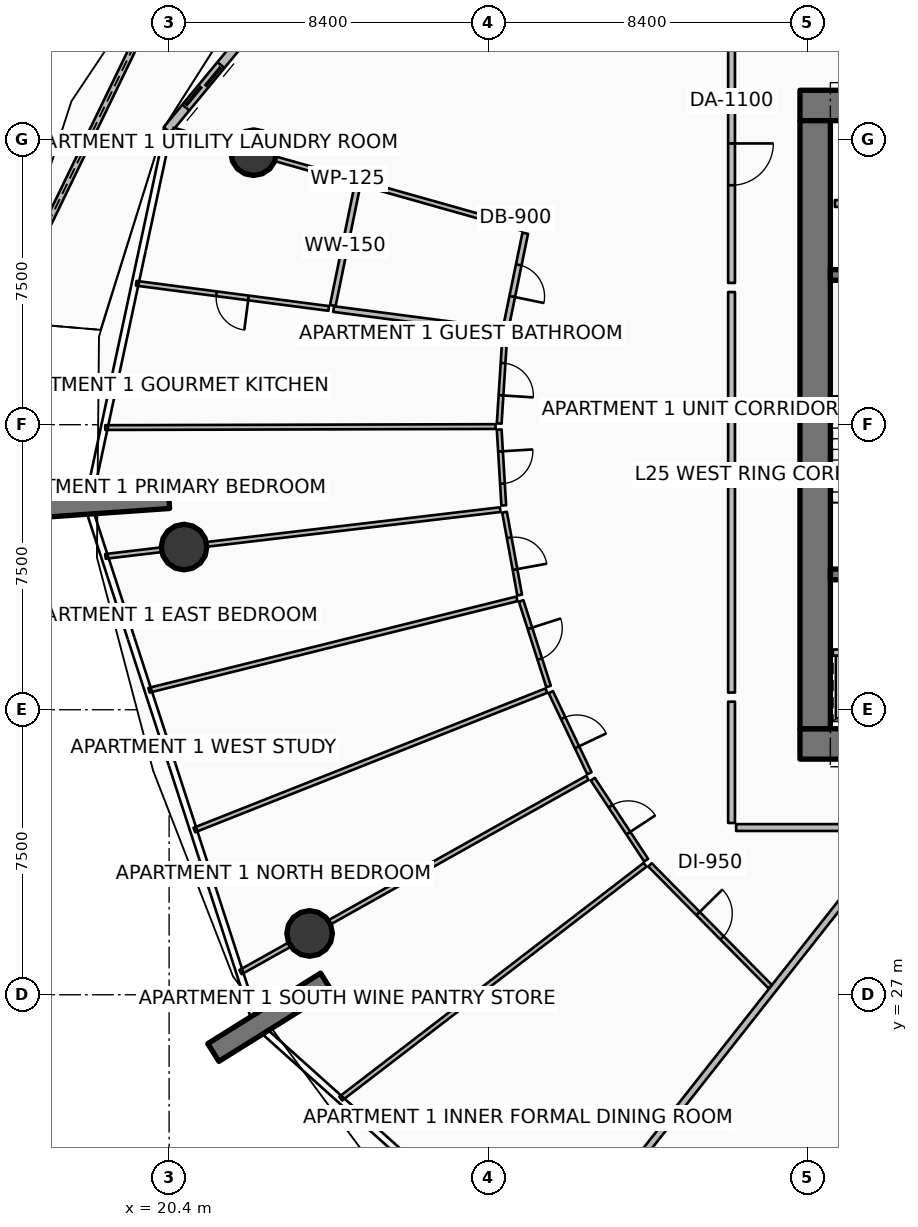
"""IFC4 building model, lengths in metres.
Left out: names, types, materials, properties, quantities, classifications, styles, units other than length and angle.
Written with IfcOpenShell. Run it as: python <this file> out.ifc"""

import sys

from ifc_helpers import new_model, si_unit, direction, frame, frame_2d, origin, origin_2d, place, context, subcontext, project, spatial, polyline, rectangle, circle, outline, extrude, element, fill, save


model = new_model("IFC4")
c1 = context("Model", 3, precision=1e-05, world=origin(), true_north=direction((0.0, 1.0)))
c2 = subcontext(c1, "Body", "Model", "MODEL_VIEW")
j1 = project(units=[si_unit("LENGTHUNIT", "METRE"), si_unit("PLANEANGLEUNIT", "RADIAN")], contexts=[c1])
p1 = place(None, origin())
s1 = spatial("IfcSite", under=j1, at=p1, CompositionType="ELEMENT")
p2 = place(p1, origin())
s2 = spatial("IfcBuilding", under=s1, at=p2, CompositionType="ELEMENT")
p3 = place(p2, frame((0.0, 0.0, 101.4)))
s3 = spatial("IfcBuildingStorey", under=s2, at=p3, CompositionType="ELEMENT", Elevation=101.4)
for number, where, z_axis, x_axis in (
    (1, (37.0, 33.6, 0.0), (0.0, 0.0, 1.0), (1.0, 0.0, 0.0)),
    (2, (37.0, 50.4, 0.0), (0.0, 0.0, 1.0), (1.0, 0.0, 0.0)),
):
    element("IfcWall", number, at=place(p3, frame(where, z_axis=z_axis, x_axis=x_axis)), inside=s3, PredefinedType="SHEAR", context=c2, shape_type="SweptSolid", body=[
        extrude(rectangle(XDim=9.9, YDim=0.8, at=frame_2d((4.95, 0.0))), origin(), (0.0, 0.0, 1.0), 3.75),
    ])
p4 = place(p3, frame((37.4, 34.0, 0.0), z_axis=(0.0, 0.0, 1.0), x_axis=(0.0, 1.0, 0.0)))
e3 = element("IfcWall", 3, at=p4, inside=s3, PredefinedType="SHEAR", context=c2, shape_type="SweptSolid", body=[
    extrude(rectangle(XDim=16.0, YDim=0.8, at=frame_2d((8.0, 0.0))), origin(), (0.0, 0.0, 1.0), 3.75),
])
for number, where, z_axis, x_axis in (
    (4, (37.8, 38.06, 0.0), (0.0, 0.0, 1.0), (1.0, 0.0, 0.0)),
    (5, (37.8, 45.94, 0.0), (0.0, 0.0, 1.0), (1.0, 0.0, 0.0)),
):
    element("IfcWall", number, at=place(p3, frame(where, z_axis=z_axis, x_axis=x_axis)), inside=s3, PredefinedType="SHEAR", context=c2, shape_type="SweptSolid", body=[
        extrude(rectangle(XDim=3.5, YDim=0.28, at=frame_2d((1.75, 0.0))), origin(), (0.0, 0.0, 1.0), 3.75),
    ])
for number, where, z_axis, x_axis in (
    (6, (20.394, 40.07, 0.0), (0.0, 0.0, 1.0), (-0.998, -0.07, 0.0)),
    (7, (24.531, 27.335, 0.0), (0.0, 0.0, 1.0), (-0.848, -0.53, 0.0)),
):
    element("IfcWall", number, at=place(p3, frame(where, z_axis=z_axis, x_axis=x_axis)), inside=s3, PredefinedType="SOLIDWALL", context=c2, shape_type="SweptSolid", body=[
        extrude(rectangle(XDim=3.5, YDim=0.55, at=frame_2d((1.75, 0.0))), origin(), (0.0, 0.0, 1.0), 3.75),
    ])
for number, where, z_axis, x_axis in (
    (8, (22.623, 49.157, 0.0), (0.0, 0.0, 1.0), (1.0, 0.0, 0.0)),
    (9, (20.793, 38.78, 0.0), (0.0, 0.0, 1.0), (1.0, 0.0, 0.0)),
    (10, (24.097, 28.614, 0.0), (0.0, 0.0, 1.0), (1.0, 0.0, 0.0)),
):
    element("IfcColumn", number, at=place(p3, frame(where, z_axis=z_axis, x_axis=x_axis)), inside=s3, PredefinedType="COLUMN", context=c2, shape_type="SweptSolid", body=[
        extrude(circle(Radius=0.6, at=origin_2d()), origin(), (0.0, 0.0, 1.0), 3.5),
    ])
p5 = place(p3, frame((21.198, 55.521, 0.0), z_axis=(0.0, 0.0, 1.0), x_axis=(-0.436107839058, -0.89989441198, 0.0)))
e11 = element("IfcWall", 11, at=p5, inside=s3, PredefinedType="PARAPET", context=c2, shape_type="SweptSolid", body=[
    extrude(outline(polyline([(0.0, 0.0), (12.005, 0.0), (12.005, 1.86), (6.002, 1.798), (0.0, 1.632), (0.0, 0.0)])), frame((0.0, 0.09, 0.0), z_axis=(0.0, -1.0, 0.0), x_axis=(1.0, 0.0, 0.0)), (0.0, 0.0, 1.0), 0.18),
])
p6 = place(p3, frame((27.407, 58.298, 0.0), z_axis=(0.0, 0.0, 1.0), x_axis=(-0.636704975, -0.771107498868, 0.0)))
e12 = element("IfcWall", 12, at=p6, inside=s3, PredefinedType="SOLIDWALL", context=c2, shape_type="SweptSolid", body=[
    extrude(rectangle(XDim=11.084, YDim=0.24, at=frame_2d((5.542, 0.0))), origin(), (0.0, 0.0, 1.0), 2.45),
])
p7 = place(p6, frame((8.864, 0.0, 0.0)))
e13 = element("IfcOpeningElement", 13, at=p7, cuts=e12, PredefinedType="OPENING", context=c2, shape_type="SweptSolid", body=[
    extrude(rectangle(XDim=1.45, YDim=2.15, at=frame_2d((0.725, 1.075))), frame((0.0, 0.13, 0.0), z_axis=(0.0, -1.0, 0.0), x_axis=(1.0, 0.0, 0.0)), (0.0, 0.0, 1.0), 0.26),
])
p8 = place(p6, frame((0.28, 0.0, 0.65)))
e14 = element("IfcOpeningElement", 14, at=p8, cuts=e12, PredefinedType="OPENING", context=c2, shape_type="SweptSolid", body=[
    extrude(rectangle(XDim=1.6, YDim=1.5, at=frame_2d((0.8, 0.75))), frame((0.0, 0.13, 0.0), z_axis=(0.0, -1.0, 0.0), x_axis=(1.0, 0.0, 0.0)), (0.0, 0.0, 1.0), 0.26),
])
p9 = place(p3, frame((37.865, 36.005, 0.0), z_axis=(0.0, 0.0, 1.0), x_axis=(1.0, 0.0, 0.0)))
e15 = element("IfcWall", 15, at=p9, inside=s3, PredefinedType="PARTITIONING", context=c2, shape_type="SweptSolid", body=[
    extrude(rectangle(XDim=2.11, YDim=0.16, at=frame_2d((1.055, 0.0))), origin(), (0.0, 0.0, 1.0), 3.5),
])
p10 = place(p9, frame((0.505, 0.0, 0.0)))
e16 = element("IfcOpeningElement", 16, at=p10, cuts=e15, PredefinedType="OPENING", context=c2, shape_type="SweptSolid", body=[
    extrude(rectangle(XDim=1.1, YDim=2.1, at=frame_2d((0.55, 1.05))), frame((0.0, 0.09, 0.0), z_axis=(0.0, -1.0, 0.0), x_axis=(1.0, 0.0, 0.0)), (0.0, 0.0, 1.0), 0.18),
])
p11 = place(p3, frame((37.92, 47.82, 0.0), z_axis=(0.0, 0.0, 1.0), x_axis=(1.0, 0.0, 0.0)))
e17 = element("IfcWall", 17, at=p11, inside=s3, PredefinedType="PARTITIONING", context=c2, shape_type="SweptSolid", body=[
    extrude(rectangle(XDim=6.26, YDim=0.18, at=frame_2d((3.13, 0.0))), origin(), (0.0, 0.0, 1.0), 3.5),
])
p12 = place(p11, frame((2.705, 0.0, 0.0)))
e18 = element("IfcOpeningElement", 18, at=p12, cuts=e17, PredefinedType="OPENING", context=c2, shape_type="SweptSolid", body=[
    extrude(rectangle(XDim=0.85, YDim=2.06, at=frame_2d((0.425, 1.03))), frame((0.0, 0.1, 0.0), z_axis=(0.0, -1.0, 0.0), x_axis=(1.0, 0.0, 0.0)), (0.0, 0.0, 1.0), 0.2),
])
p13 = place(p3, frame((39.575, 31.314, 0.0), z_axis=(0.0, 0.0, 1.0), x_axis=(-0.619083417853, -0.785325233098, 0.0)))
e19 = element("IfcWall", 19, at=p13, inside=s3, PredefinedType="PARTITIONING", context=c2, shape_type="SweptSolid", body=[
    extrude(rectangle(XDim=15.063, YDim=0.18, at=frame_2d((7.532, 0.0))), origin(), (0.0, 0.0, 1.0), 2.94),
])
p14 = place(p3, frame((35.2, 51.971, 0.0), z_axis=(0.0, 0.0, 1.0), x_axis=(0.0, -1.0, 0.0)))
e20 = element("IfcWall", 20, at=p14, inside=s3, PredefinedType="PARTITIONING", context=c2, shape_type="SweptSolid", body=[
    extrude(rectangle(XDim=6.241, YDim=0.18, at=frame_2d((3.12, 0.0))), origin(), (0.0, 0.0, 1.0), 2.94),
])
p15 = place(p14, frame((2.57, 0.0, 0.0)))
e21 = element("IfcOpeningElement", 21, at=p15, cuts=e20, PredefinedType="OPENING", context=c2, shape_type="SweptSolid", body=[
    extrude(rectangle(XDim=1.1, YDim=2.1, at=frame_2d((0.55, 1.05))), frame((0.0, 0.1, 0.0), z_axis=(0.0, -1.0, 0.0), x_axis=(1.0, 0.0, 0.0)), (0.0, 0.0, 1.0), 0.2),
])
p16 = place(p3, frame((35.2, 45.49, 0.0), z_axis=(0.0, 0.0, 1.0), x_axis=(0.0, -1.0, 0.0)))
e22 = element("IfcWall", 22, at=p16, inside=s3, PredefinedType="PARTITIONING", context=c2, shape_type="SweptSolid", body=[
    extrude(rectangle(XDim=4.885, YDim=0.18, at=frame_2d((2.442, 0.0))), origin(), (0.0, 0.0, 1.0), 2.94),
])
p17 = place(p3, frame((29.695, 47.163, 0.0), z_axis=(0.0, 0.0, 1.0), x_axis=(-0.962455839824, 0.271438310467, 0.0)))
e23 = element("IfcWall", 23, at=p17, inside=s3, PredefinedType="PARTITIONING", context=c2, shape_type="SweptSolid", body=[
    extrude(rectangle(XDim=9.552, YDim=0.125, at=frame_2d((4.776, 0.0))), origin(), (0.0, 0.0, 1.0), 2.94),
])
p18 = place(p3, frame((29.771, 47.037, 0.0), z_axis=(0.0, 0.0, 1.0), x_axis=(-0.201031337284, -0.979584810739, 0.0)))
e24 = element("IfcWall", 24, at=p18, inside=s3, PredefinedType="PARTITIONING", context=c2, shape_type="SweptSolid", body=[
    extrude(rectangle(XDim=2.549, YDim=0.15, at=frame_2d((1.274, 0.0))), origin(), (0.0, 0.0, 1.0), 2.94),
])
p19 = place(p18, frame((0.85, 0.0, 0.0)))
e25 = element("IfcOpeningElement", 25, at=p19, cuts=e24, PredefinedType="OPENING", context=c2, shape_type="SweptSolid", body=[
    extrude(rectangle(XDim=0.85, YDim=2.06, at=frame_2d((0.425, 1.03))), frame((0.0, 0.085, 0.0), z_axis=(0.0, -1.0, 0.0), x_axis=(1.0, 0.0, 0.0)), (0.0, 0.0, 1.0), 0.17),
])
p20 = place(p3, frame((25.354, 48.283, 0.0), z_axis=(0.0, 0.0, 1.0), x_axis=(-0.201037617238, -0.979583521939, 0.0)))
e26 = element("IfcWall", 26, at=p20, inside=s3, PredefinedType="PARTITIONING", context=c2, shape_type="SweptSolid", body=[
    extrude(rectangle(XDim=3.213, YDim=0.15, at=frame_2d((1.607, 0.0))), origin(), (0.0, 0.0, 1.0), 2.94),
])
p21 = place(p3, frame((29.151, 44.464, 0.0), z_axis=(0.0, 0.0, 1.0), x_axis=(-0.991563130501, 0.129624682181, 0.0)))
e27 = element("IfcWall", 27, at=p21, inside=s3, PredefinedType="PARTITIONING", context=c2, shape_type="SweptSolid", body=[
    extrude(rectangle(XDim=4.46, YDim=0.15, at=frame_2d((2.23, 0.0))), origin(), (0.0, 0.0, 1.0), 2.94),
])
p22 = place(p3, frame((24.6, 45.059, 0.0), z_axis=(0.0, 0.0, 1.0), x_axis=(-0.991566000337, 0.129602727501, 0.0)))
e28 = element("IfcWall", 28, at=p22, inside=s3, PredefinedType="PARTITIONING", context=c2, shape_type="SweptSolid", body=[
    extrude(rectangle(XDim=5.109, YDim=0.125, at=frame_2d((2.554, 0.0))), origin(), (0.0, 0.0, 1.0), 2.94),
])
p23 = place(p22, frame((2.129, 0.0, 0.0)))
e29 = element("IfcOpeningElement", 29, at=p23, cuts=e28, PredefinedType="OPENING", context=c2, shape_type="SweptSolid", body=[
    extrude(rectangle(XDim=0.85, YDim=2.06, at=frame_2d((0.425, 1.03))), frame((0.0, 0.073, 0.0), z_axis=(0.0, -1.0, 0.0), x_axis=(1.0, 0.0, 0.0)), (0.0, 0.0, 1.0), 0.145),
])
p24 = place(p3, frame((28.991, 41.951, 0.0), z_axis=(0.0, 0.0, 1.0), x_axis=(-0.999996643903, -0.002590788034, 0.0)))
e30 = element("IfcWall", 30, at=p24, inside=s3, PredefinedType="PARTITIONING", context=c2, shape_type="SweptSolid", body=[
    extrude(rectangle(XDim=10.271, YDim=0.125, at=frame_2d((5.136, 0.0))), origin(), (0.0, 0.0, 1.0), 2.94),
])
p25 = place(p3, frame((29.235, 44.362, 0.0), z_axis=(0.0, 0.0, 1.0), x_axis=(-0.063647003528, -0.99797247404, 0.0)))
e31 = element("IfcWall", 31, at=p25, inside=s3, PredefinedType="PARTITIONING", context=c2, shape_type="SweptSolid", body=[
    extrude(rectangle(XDim=2.336, YDim=0.125, at=frame_2d((1.168, 0.0))), origin(), (0.0, 0.0, 1.0), 2.94),
])
p26 = place(p25, frame((0.743, 0.0, 0.0)))
e32 = element("IfcOpeningElement", 32, at=p26, cuts=e31, PredefinedType="OPENING", context=c2, shape_type="SweptSolid", body=[
    extrude(rectangle(XDim=0.85, YDim=2.06, at=frame_2d((0.425, 1.03))), frame((0.0, 0.073, 0.0), z_axis=(0.0, -1.0, 0.0), x_axis=(1.0, 0.0, 0.0)), (0.0, 0.0, 1.0), 0.145),
])
p27 = place(p3, frame((29.086, 41.871, 0.0), z_axis=(0.0, 0.0, 1.0), x_axis=(0.060104090143, -0.99819211495, 0.0)))
e33 = element("IfcWall", 33, at=p27, inside=s3, PredefinedType="PARTITIONING", context=c2, shape_type="SweptSolid", body=[
    extrude(rectangle(XDim=1.999, YDim=0.125, at=frame_2d((0.999, 0.0))), origin(), (0.0, 0.0, 1.0), 2.94),
])
p28 = place(p27, frame((0.574, 0.0, 0.0)))
e34 = element("IfcOpeningElement", 34, at=p28, cuts=e33, PredefinedType="OPENING", context=c2, shape_type="SweptSolid", body=[
    extrude(rectangle(XDim=0.85, YDim=2.06, at=frame_2d((0.425, 1.03))), frame((0.0, 0.073, 0.0), z_axis=(0.0, -1.0, 0.0), x_axis=(1.0, 0.0, 0.0)), (0.0, 0.0, 1.0), 0.145),
])
p29 = place(p3, frame((35.2, 40.365, 0.0), z_axis=(0.0, 0.0, 1.0), x_axis=(0.0, -1.0, 0.0)))
e35 = element("IfcWall", 35, at=p29, inside=s3, PredefinedType="PARTITIONING", context=c2, shape_type="SweptSolid", body=[
    extrude(rectangle(XDim=5.413, YDim=0.18, at=frame_2d((2.707, 0.0))), origin(), (0.0, 0.0, 1.0), 2.94),
])
p30 = place(p3, frame((29.113, 39.764, 0.0), z_axis=(0.0, 0.0, 1.0), x_axis=(-0.993070875002, -0.117516965677, 0.0)))
e36 = element("IfcWall", 36, at=p30, inside=s3, PredefinedType="PARTITIONING", context=c2, shape_type="SweptSolid", body=[
    extrude(rectangle(XDim=10.46, YDim=0.125, at=frame_2d((5.23, 0.0))), origin(), (0.0, 0.0, 1.0), 2.94),
])
p31 = place(p3, frame((29.552, 37.417, 0.0), z_axis=(0.0, 0.0, 1.0), x_axis=(-0.970504192203, -0.241084244437, 0.0)))
e37 = element("IfcWall", 37, at=p31, inside=s3, PredefinedType="PARTITIONING", context=c2, shape_type="SweptSolid", body=[
    extrude(rectangle(XDim=9.976, YDim=0.125, at=frame_2d((4.988, 0.0))), origin(), (0.0, 0.0, 1.0), 2.94),
])
p32 = place(p3, frame((30.326, 35.002, 0.0), z_axis=(0.0, 0.0, 1.0), x_axis=(-0.929777602375, -0.368121732748, 0.0)))
e38 = element("IfcWall", 38, at=p32, inside=s3, PredefinedType="PARTITIONING", context=c2, shape_type="SweptSolid", body=[
    extrude(rectangle(XDim=9.961, YDim=0.125, at=frame_2d((4.98, 0.0))), origin(), (0.0, 0.0, 1.0), 2.94),
])
p33 = place(p3, frame((29.227, 39.698, 0.0), z_axis=(0.0, 0.0, 1.0), x_axis=(0.179602920825, -0.983739188419, 0.0)))
e39 = element("IfcWall", 39, at=p33, inside=s3, PredefinedType="PARTITIONING", context=c2, shape_type="SweptSolid", body=[
    extrude(rectangle(XDim=2.216, YDim=0.125, at=frame_2d((1.108, 0.0))), origin(), (0.0, 0.0, 1.0), 2.94),
])
p34 = place(p33, frame((0.683, 0.0, 0.0)))
e40 = element("IfcOpeningElement", 40, at=p34, cuts=e39, PredefinedType="OPENING", context=c2, shape_type="SweptSolid", body=[
    extrude(rectangle(XDim=0.85, YDim=2.06, at=frame_2d((0.425, 1.03))), frame((0.0, 0.073, 0.0), z_axis=(0.0, -1.0, 0.0), x_axis=(1.0, 0.0, 0.0)), (0.0, 0.0, 1.0), 0.145),
])
p35 = place(p3, frame((29.663, 37.363, 0.0), z_axis=(0.0, 0.0, 1.0), x_axis=(0.305393983716, -0.952226083822, 0.0)))
e41 = element("IfcWall", 41, at=p35, inside=s3, PredefinedType="PARTITIONING", context=c2, shape_type="SweptSolid", body=[
    extrude(rectangle(XDim=2.364, YDim=0.125, at=frame_2d((1.182, 0.0))), origin(), (0.0, 0.0, 1.0), 2.94),
])
p36 = place(p35, frame((0.757, 0.0, 0.0)))
e42 = element("IfcOpeningElement", 42, at=p36, cuts=e41, PredefinedType="OPENING", context=c2, shape_type="SweptSolid", body=[
    extrude(rectangle(XDim=0.85, YDim=2.06, at=frame_2d((0.425, 1.03))), frame((0.0, 0.073, 0.0), z_axis=(0.0, -1.0, 0.0), x_axis=(1.0, 0.0, 0.0)), (0.0, 0.0, 1.0), 0.145),
])
p37 = place(p3, frame((30.444, 34.963, 0.0), z_axis=(0.0, 0.0, 1.0), x_axis=(0.429404357622, -0.903112339443, 0.0)))
e43 = element("IfcWall", 43, at=p37, inside=s3, PredefinedType="PARTITIONING", context=c2, shape_type="SweptSolid", body=[
    extrude(rectangle(XDim=2.364, YDim=0.125, at=frame_2d((1.182, 0.0))), origin(), (0.0, 0.0, 1.0), 2.94),
])
p38 = place(p37, frame((0.757, 0.0, 0.0)))
e44 = element("IfcOpeningElement", 44, at=p38, cuts=e43, PredefinedType="OPENING", context=c2, shape_type="SweptSolid", body=[
    extrude(rectangle(XDim=0.85, YDim=2.06, at=frame_2d((0.425, 1.03))), frame((0.0, 0.073, 0.0), z_axis=(0.0, -1.0, 0.0), x_axis=(1.0, 0.0, 0.0)), (0.0, 0.0, 1.0), 0.145),
])
p39 = place(p3, frame((35.2, 34.712, 0.0), z_axis=(0.0, 0.0, 1.0), x_axis=(0.0, -1.0, 0.0)))
e45 = element("IfcWall", 45, at=p39, inside=s3, PredefinedType="PARTITIONING", context=c2, shape_type="SweptSolid", body=[
    extrude(rectangle(XDim=3.192, YDim=0.18, at=frame_2d((1.596, 0.0))), origin(), (0.0, 0.0, 1.0), 2.94),
])
p40 = place(p3, frame((35.32, 31.4, 0.0), z_axis=(0.0, 0.0, 1.0), x_axis=(1.0, 0.0, 0.0)))
e46 = element("IfcWall", 46, at=p40, inside=s3, PredefinedType="PARTITIONING", context=c2, shape_type="SweptSolid", body=[
    extrude(rectangle(XDim=4.204, YDim=0.18, at=frame_2d((2.102, 0.0))), origin(), (0.0, 0.0, 1.0), 2.94),
])
p41 = place(p3, frame((31.406, 32.707, 0.0), z_axis=(0.0, 0.0, 1.0), x_axis=(-0.872500841978, -0.488612608052, 0.0)))
e47 = element("IfcWall", 47, at=p41, inside=s3, PredefinedType="PARTITIONING", context=c2, shape_type="SweptSolid", body=[
    extrude(rectangle(XDim=10.46, YDim=0.125, at=frame_2d((5.23, 0.0))), origin(), (0.0, 0.0, 1.0), 2.94),
])
p42 = place(p3, frame((32.925, 30.42, 0.0), z_axis=(0.0, 0.0, 1.0), x_axis=(-0.793033627653, -0.609177860244, 0.0)))
e48 = element("IfcWall", 48, at=p42, inside=s3, PredefinedType="PARTITIONING", context=c2, shape_type="SweptSolid", body=[
    extrude(rectangle(XDim=10.099, YDim=0.125, at=frame_2d((5.049, 0.0))), origin(), (0.0, 0.0, 1.0), 2.94),
])
p43 = place(p3, frame((31.548, 32.672, 0.0), z_axis=(0.0, 0.0, 1.0), x_axis=(0.550387635728, -0.834909246827, 0.0)))
e49 = element("IfcWall", 49, at=p43, inside=s3, PredefinedType="PARTITIONING", context=c2, shape_type="SweptSolid", body=[
    extrude(rectangle(XDim=2.552, YDim=0.125, at=frame_2d((1.276, 0.0))), origin(), (0.0, 0.0, 1.0), 2.94),
])
p44 = place(p43, frame((0.851, 0.0, 0.0)))
e50 = element("IfcOpeningElement", 50, at=p44, cuts=e49, PredefinedType="OPENING", context=c2, shape_type="SweptSolid", body=[
    extrude(rectangle(XDim=0.85, YDim=2.06, at=frame_2d((0.425, 1.03))), frame((0.0, 0.073, 0.0), z_axis=(0.0, -1.0, 0.0), x_axis=(1.0, 0.0, 0.0)), (0.0, 0.0, 1.0), 0.145),
])
p45 = place(p3, frame((33.053, 30.418, 0.0), z_axis=(0.0, 0.0, 1.0), x_axis=(0.702647387595, -0.711538227157, 0.0)))
e51 = element("IfcWall", 51, at=p45, inside=s3, PredefinedType="PARTITIONING", context=c2, shape_type="SweptSolid", body=[
    extrude(rectangle(XDim=4.503, YDim=0.125, at=frame_2d((2.252, 0.0))), origin(), (0.0, 0.0, 1.0), 2.94),
])
p46 = place(p45, frame((1.802, 0.0, 0.0)))
e52 = element("IfcOpeningElement", 52, at=p46, cuts=e51, PredefinedType="OPENING", context=c2, shape_type="SweptSolid", body=[
    extrude(rectangle(XDim=0.9, YDim=2.08, at=frame_2d((0.45, 1.04))), frame((0.0, 0.073, 0.0), z_axis=(0.0, -1.0, 0.0), x_axis=(1.0, 0.0, 0.0)), (0.0, 0.0, 1.0), 0.145),
])
p47 = place(p7, origin())
e53 = element("IfcDoor", 53, at=p47, inside=s3, OperationType="DOUBLE_DOOR_SLIDING", PredefinedType="DOOR", context=c2, shape_type="SweptSolid", body=[
    extrude(rectangle(XDim=1.45, YDim=2.15, at=frame_2d((0.725, 1.075))), frame((0.0, 0.025, 0.0), z_axis=(0.0, -1.0, 0.0), x_axis=(1.0, 0.0, 0.0)), (0.0, 0.0, 1.0), 0.05),
])
fill(e13, e53)
p48 = place(p15, origin())
e54 = element("IfcDoor", 54, at=p48, inside=s3, OperationType="SINGLE_SWING_LEFT", PredefinedType="DOOR", context=c2, shape_type="SweptSolid", body=[
    extrude(rectangle(XDim=1.1, YDim=2.1, at=frame_2d((0.55, 1.05))), frame((0.0, 0.025, 0.0), z_axis=(0.0, -1.0, 0.0), x_axis=(1.0, 0.0, 0.0)), (0.0, 0.0, 1.0), 0.05),
])
fill(e21, e54)
p49 = place(p19, origin())
e55 = element("IfcDoor", 55, at=p49, inside=s3, OperationType="SINGLE_SWING_RIGHT", PredefinedType="DOOR", context=c2, shape_type="SweptSolid", body=[
    extrude(rectangle(XDim=0.85, YDim=2.06, at=frame_2d((0.425, 1.03))), frame((0.0, 0.025, 0.0), z_axis=(0.0, -1.0, 0.0), x_axis=(1.0, 0.0, 0.0)), (0.0, 0.0, 1.0), 0.05),
])
fill(e25, e55)
p50 = place(p23, origin())
e56 = element("IfcDoor", 56, at=p50, inside=s3, OperationType="SINGLE_SWING_LEFT", PredefinedType="DOOR", context=c2, shape_type="SweptSolid", body=[
    extrude(rectangle(XDim=0.85, YDim=2.06, at=frame_2d((0.425, 1.03))), frame((0.0, 0.025, 0.0), z_axis=(0.0, -1.0, 0.0), x_axis=(1.0, 0.0, 0.0)), (0.0, 0.0, 1.0), 0.05),
])
fill(e29, e56)
p51 = place(p26, origin())
e57 = element("IfcDoor", 57, at=p51, inside=s3, OperationType="SINGLE_SWING_RIGHT", PredefinedType="DOOR", context=c2, shape_type="SweptSolid", body=[
    extrude(rectangle(XDim=0.85, YDim=2.06, at=frame_2d((0.425, 1.03))), frame((0.0, 0.025, 0.0), z_axis=(0.0, -1.0, 0.0), x_axis=(1.0, 0.0, 0.0)), (0.0, 0.0, 1.0), 0.05),
])
fill(e32, e57)
p52 = place(p28, origin())
e58 = element("IfcDoor", 58, at=p52, inside=s3, OperationType="SINGLE_SWING_LEFT", PredefinedType="DOOR", context=c2, shape_type="SweptSolid", body=[
    extrude(rectangle(XDim=0.85, YDim=2.06, at=frame_2d((0.425, 1.03))), frame((0.0, 0.025, 0.0), z_axis=(0.0, -1.0, 0.0), x_axis=(1.0, 0.0, 0.0)), (0.0, 0.0, 1.0), 0.05),
])
fill(e34, e58)
p53 = place(p34, origin())
e59 = element("IfcDoor", 59, at=p53, inside=s3, OperationType="SINGLE_SWING_RIGHT", PredefinedType="DOOR", context=c2, shape_type="SweptSolid", body=[
    extrude(rectangle(XDim=0.85, YDim=2.06, at=frame_2d((0.425, 1.03))), frame((0.0, 0.025, 0.0), z_axis=(0.0, -1.0, 0.0), x_axis=(1.0, 0.0, 0.0)), (0.0, 0.0, 1.0), 0.05),
])
fill(e40, e59)
p54 = place(p36, origin())
e60 = element("IfcDoor", 60, at=p54, inside=s3, OperationType="SINGLE_SWING_LEFT", PredefinedType="DOOR", context=c2, shape_type="SweptSolid", body=[
    extrude(rectangle(XDim=0.85, YDim=2.06, at=frame_2d((0.425, 1.03))), frame((0.0, 0.025, 0.0), z_axis=(0.0, -1.0, 0.0), x_axis=(1.0, 0.0, 0.0)), (0.0, 0.0, 1.0), 0.05),
])
fill(e42, e60)
p55 = place(p38, origin())
e61 = element("IfcDoor", 61, at=p55, inside=s3, OperationType="SINGLE_SWING_RIGHT", PredefinedType="DOOR", context=c2, shape_type="SweptSolid", body=[
    extrude(rectangle(XDim=0.85, YDim=2.06, at=frame_2d((0.425, 1.03))), frame((0.0, 0.025, 0.0), z_axis=(0.0, -1.0, 0.0), x_axis=(1.0, 0.0, 0.0)), (0.0, 0.0, 1.0), 0.05),
])
fill(e44, e61)
p56 = place(p44, origin())
e62 = element("IfcDoor", 62, at=p56, inside=s3, OperationType="SINGLE_SWING_RIGHT", PredefinedType="DOOR", context=c2, shape_type="SweptSolid", body=[
    extrude(rectangle(XDim=0.85, YDim=2.06, at=frame_2d((0.425, 1.03))), frame((0.0, 0.025, 0.0), z_axis=(0.0, -1.0, 0.0), x_axis=(1.0, 0.0, 0.0)), (0.0, 0.0, 1.0), 0.05),
])
fill(e50, e62)
p57 = place(p46, origin())
e63 = element("IfcDoor", 63, at=p57, inside=s3, OperationType="SINGLE_SWING_LEFT", PredefinedType="DOOR", context=c2, shape_type="SweptSolid", body=[
    extrude(rectangle(XDim=0.9, YDim=2.08, at=frame_2d((0.45, 1.04))), frame((0.0, 0.025, 0.0), z_axis=(0.0, -1.0, 0.0), x_axis=(1.0, 0.0, 0.0)), (0.0, 0.0, 1.0), 0.05),
])
fill(e52, e63)
save(model, sys.argv[1])
